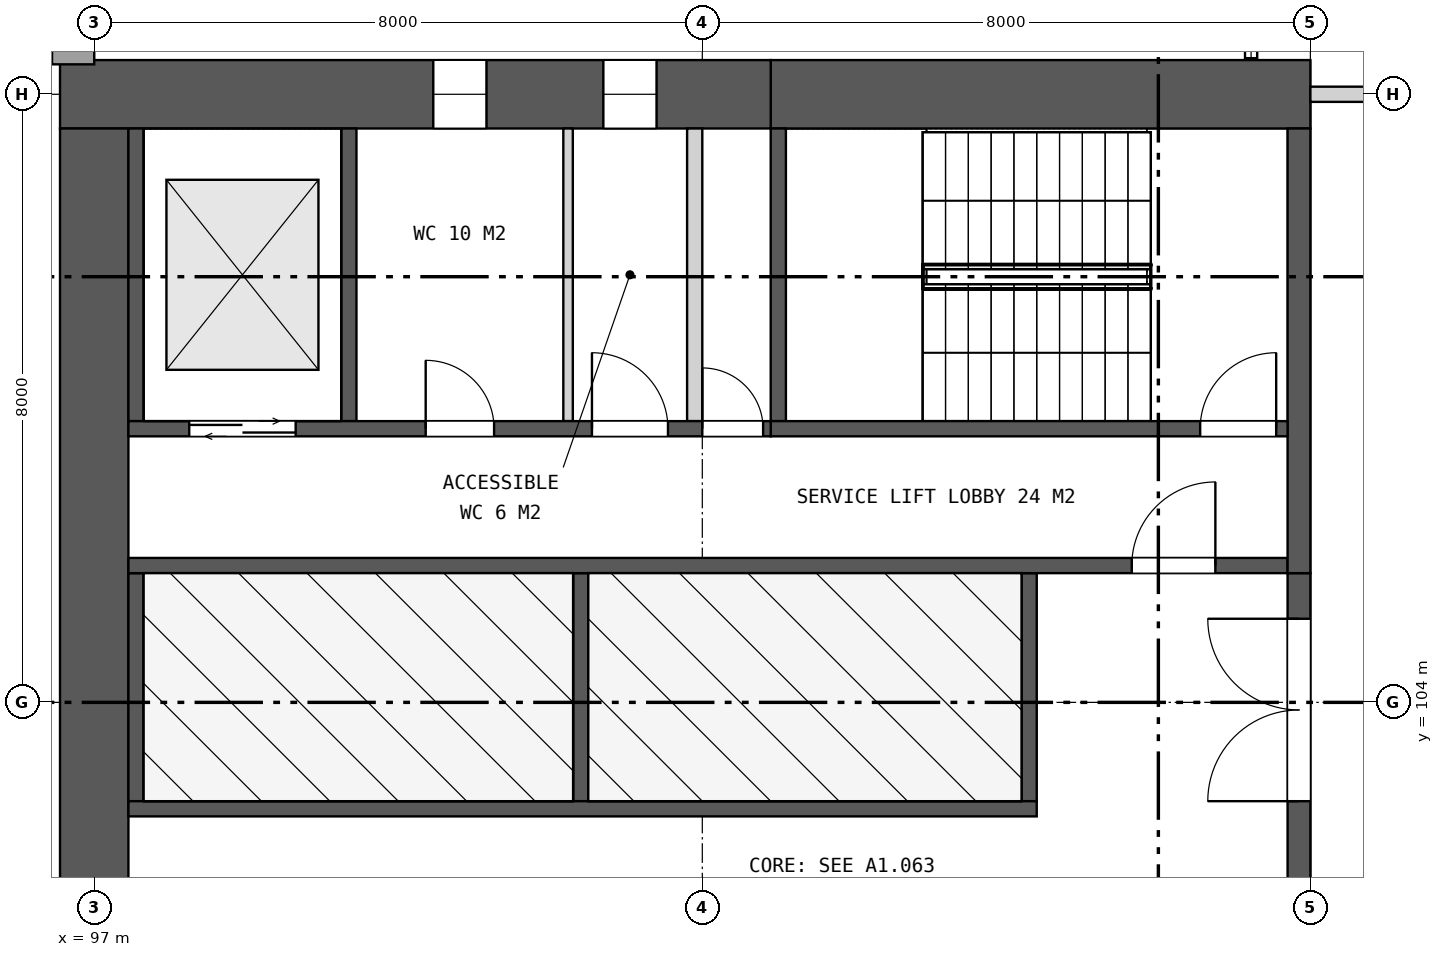
"""IFC4 building model, lengths in metres.
Left out: names, types, materials, properties, quantities, classifications, styles, units other than length and angle.
Written with IfcOpenShell. Run it as: python <this file> out.ifc"""

import sys

from ifc_helpers import new_model, si_unit, direction, frame, frame_2d, origin, place, context, subcontext, project, spatial, rectangle, extrude, element, fill, save


model = new_model("IFC4")
c1 = context("Model", 3, precision=1e-05, world=origin(), true_north=direction((0.0, 1.0)))
c2 = subcontext(c1, "Body", "Model", "MODEL_VIEW")
j1 = project(units=[si_unit("LENGTHUNIT", "METRE"), si_unit("PLANEANGLEUNIT", "RADIAN")], contexts=[c1])
p1 = place(None, origin())
s1 = spatial("IfcSite", under=j1, at=p1, CompositionType="ELEMENT")
p2 = place(p1, origin())
s2 = spatial("IfcBuilding", under=s1, at=p2, CompositionType="ELEMENT")
p3 = place(p2, frame((0.0, 0.0, 41.5)))
s3 = spatial("IfcBuildingStorey", under=s2, at=p3, CompositionType="ELEMENT", Elevation=41.5)
p4 = place(p3, frame((113.0, 112.0, 0.0), z_axis=(0.0, 0.0, 1.0), x_axis=(-1.0, 0.0, 0.0)))
e1 = element("IfcWall", 1, at=p4, inside=s3, PredefinedType="SHEAR", context=c2, shape_type="SweptSolid", body=[
    extrude(rectangle(XDim=7.1, YDim=0.9, at=frame_2d((3.55, 0.0))), origin(), (0.0, 0.0, 1.0), 6.0),
])
p5 = place(p3, frame((105.9, 112.0, 0.0), z_axis=(0.0, 0.0, 1.0), x_axis=(-1.0, 0.0, 0.0)))
e2 = element("IfcWall", 2, at=p5, inside=s3, PredefinedType="SHEAR", context=c2, shape_type="SweptSolid", body=[
    extrude(rectangle(XDim=9.35, YDim=0.9, at=frame_2d((4.675, 0.0))), origin(), (0.0, 0.0, 1.0), 6.0),
])
p6 = place(p5, frame((1.502, 0.0, 1.5)))
e3 = element("IfcOpeningElement", 3, at=p6, cuts=e2, PredefinedType="OPENING", context=c2, shape_type="SweptSolid", body=[
    extrude(rectangle(XDim=0.7, YDim=0.9, at=frame_2d((0.35, 0.45))), frame((0.0, 0.46, 0.0), z_axis=(0.0, -1.0, 0.0), x_axis=(1.0, 0.0, 0.0)), (0.0, 0.0, 1.0), 0.92),
])
p7 = place(p5, frame((3.739, 0.0, 1.5)))
e4 = element("IfcOpeningElement", 4, at=p7, cuts=e2, PredefinedType="OPENING", context=c2, shape_type="SweptSolid", body=[
    extrude(rectangle(XDim=0.7, YDim=0.9, at=frame_2d((0.35, 0.45))), frame((0.0, 0.46, 0.0), z_axis=(0.0, -1.0, 0.0), x_axis=(1.0, 0.0, 0.0)), (0.0, 0.0, 1.0), 0.92),
])
p8 = place(p3, frame((97.0, 111.55, 0.0), z_axis=(0.0, 0.0, 1.0), x_axis=(0.0, -1.0, 0.0)))
e5 = element("IfcWall", 5, at=p8, inside=s3, PredefinedType="SHEAR", context=c2, shape_type="SweptSolid", body=[
    extrude(rectangle(XDim=23.1, YDim=0.9, at=frame_2d((11.55, 0.0))), origin(), (0.0, 0.0, 1.0), 6.0),
])
p9 = place(p8, frame((10.35, 0.0, 0.0)))
e6 = element("IfcOpeningElement", 6, at=p9, cuts=e5, PredefinedType="OPENING", context=c2, shape_type="SweptSolid", body=[
    extrude(rectangle(XDim=2.4, YDim=2.4, at=frame_2d((1.2, 1.2))), frame((0.0, 0.46, 0.0), z_axis=(0.0, -1.0, 0.0), x_axis=(1.0, 0.0, 0.0)), (0.0, 0.0, 1.0), 0.92),
])
p10 = place(p3, frame((112.85, 105.7, 0.0), z_axis=(0.0, 0.0, 1.0), x_axis=(0.0, -1.0, 0.0)))
e7 = element("IfcWall", 7, at=p10, inside=s3, PredefinedType="SHEAR", context=c2, shape_type="SweptSolid", body=[
    extrude(rectangle(XDim=11.4, YDim=0.3, at=frame_2d((5.7, 0.0))), origin(), (0.0, 0.0, 1.0), 6.0),
])
p11 = place(p10, frame((0.6, 0.0, 0.0)))
e8 = element("IfcOpeningElement", 8, at=p11, cuts=e7, PredefinedType="OPENING", context=c2, shape_type="SweptSolid", body=[
    extrude(rectangle(XDim=2.4, YDim=2.4, at=frame_2d((1.2, 1.2))), frame((0.0, 0.16, 0.0), z_axis=(0.0, -1.0, 0.0), x_axis=(1.0, 0.0, 0.0)), (0.0, 0.0, 1.0), 0.32),
])
p12 = place(p10, frame((4.5, 0.0, 0.0)))
e9 = element("IfcOpeningElement", 9, at=p12, cuts=e7, PredefinedType="OPENING", context=c2, shape_type="SweptSolid", body=[
    extrude(rectangle(XDim=2.4, YDim=2.4, at=frame_2d((1.2, 1.2))), frame((0.0, 0.16, 0.0), z_axis=(0.0, -1.0, 0.0), x_axis=(1.0, 0.0, 0.0)), (0.0, 0.0, 1.0), 0.32),
])
p13 = place(p10, frame((8.4, 0.0, 0.0)))
e10 = element("IfcOpeningElement", 10, at=p13, cuts=e7, PredefinedType="OPENING", context=c2, shape_type="SweptSolid", body=[
    extrude(rectangle(XDim=2.4, YDim=2.4, at=frame_2d((1.2, 1.2))), frame((0.0, 0.16, 0.0), z_axis=(0.0, -1.0, 0.0), x_axis=(1.0, 0.0, 0.0)), (0.0, 0.0, 1.0), 0.32),
])
for number, where, z_axis, x_axis in (
    (11, (109.3, 105.7, 0.0), (0.0, 0.0, 1.0), (0.0, -1.0, 0.0)),
    (12, (103.4, 105.7, 0.0), (0.0, 0.0, 1.0), (0.0, -1.0, 0.0)),
    (13, (97.55, 105.7, 0.0), (0.0, 0.0, 1.0), (0.0, -1.0, 0.0)),
):
    element("IfcWall", number, at=place(p3, frame(where, z_axis=z_axis, x_axis=x_axis)), inside=s3, PredefinedType="SHEAR", context=c2, shape_type="SweptSolid", body=[
        extrude(rectangle(XDim=3.0, YDim=0.2, at=frame_2d((1.5, 0.0))), origin(), (0.0, 0.0, 1.0), 6.0),
    ])
p14 = place(p3, frame((109.4, 102.6, 0.0), z_axis=(0.0, 0.0, 1.0), x_axis=(-1.0, 0.0, 0.0)))
e14 = element("IfcWall", 14, at=p14, inside=s3, PredefinedType="SHEAR", context=c2, shape_type="SweptSolid", body=[
    extrude(rectangle(XDim=11.95, YDim=0.2, at=frame_2d((5.975, 0.0))), origin(), (0.0, 0.0, 1.0), 6.0),
])
p15 = place(p3, frame((112.7, 105.8, 0.0), z_axis=(0.0, 0.0, 1.0), x_axis=(-1.0, 0.0, 0.0)))
e15 = element("IfcWall", 15, at=p15, inside=s3, PredefinedType="SHEAR", context=c2, shape_type="SweptSolid", body=[
    extrude(rectangle(XDim=15.25, YDim=0.2, at=frame_2d((7.625, 0.0))), origin(), (0.0, 0.0, 1.0), 6.0),
])
p16 = place(p15, frame((0.95, 0.0, 0.0)))
e16 = element("IfcOpeningElement", 16, at=p16, cuts=e15, PredefinedType="OPENING", context=c2, shape_type="SweptSolid", body=[
    extrude(rectangle(XDim=1.1, YDim=2.1, at=frame_2d((0.55, 1.05))), frame((0.0, 0.11, 0.0), z_axis=(0.0, -1.0, 0.0), x_axis=(1.0, 0.0, 0.0)), (0.0, 0.0, 1.0), 0.22),
])
p17 = place(p3, frame((112.85, 111.55, 0.0), z_axis=(0.0, 0.0, 1.0), x_axis=(0.0, -1.0, 0.0)))
e17 = element("IfcWall", 17, at=p17, inside=s3, PredefinedType="SHEAR", context=c2, shape_type="SweptSolid", body=[
    extrude(rectangle(XDim=5.85, YDim=0.3, at=frame_2d((2.925, 0.0))), origin(), (0.0, 0.0, 1.0), 6.0),
])
for number, where, z_axis, x_axis in (
    (18, (106.0, 111.55, 0.0), (0.0, 0.0, 1.0), (0.0, -1.0, 0.0)),
    (19, (100.35, 111.55, 0.0), (0.0, 0.0, 1.0), (0.0, -1.0, 0.0)),
    (20, (97.55, 111.55, 0.0), (0.0, 0.0, 1.0), (0.0, -1.0, 0.0)),
):
    element("IfcWall", number, at=place(p3, frame(where, z_axis=z_axis, x_axis=x_axis)), inside=s3, PredefinedType="SHEAR", context=c2, shape_type="SweptSolid", body=[
        extrude(rectangle(XDim=3.85, YDim=0.2, at=frame_2d((1.925, 0.0))), origin(), (0.0, 0.0, 1.0), 6.0),
    ])
p18 = place(p3, frame((104.9, 111.55, 0.0), z_axis=(0.0, 0.0, 1.0), x_axis=(0.0, -1.0, 0.0)))
e21 = element("IfcWall", 21, at=p18, inside=s3, PredefinedType="PARTITIONING", context=c2, shape_type="SweptSolid", body=[
    extrude(rectangle(XDim=3.85, YDim=0.2, at=frame_2d((1.925, 0.0))), origin(), (0.0, 0.0, 1.0), 6.0),
])
p19 = place(p3, frame((103.234, 111.55, 0.0), z_axis=(0.0, 0.0, 1.0), x_axis=(0.0, -1.0, 0.0)))
e22 = element("IfcWall", 22, at=p19, inside=s3, PredefinedType="PARTITIONING", context=c2, shape_type="SweptSolid", body=[
    extrude(rectangle(XDim=3.85, YDim=0.125, at=frame_2d((1.925, 0.0))), origin(), (0.0, 0.0, 1.0), 6.0),
])
p20 = place(p3, frame((112.7, 107.6, 0.0), z_axis=(0.0, 0.0, 1.0), x_axis=(-1.0, 0.0, 0.0)))
e23 = element("IfcWall", 23, at=p20, inside=s3, PredefinedType="SHEAR", context=c2, shape_type="SweptSolid", body=[
    extrude(rectangle(XDim=6.8, YDim=0.2, at=frame_2d((3.4, 0.0))), origin(), (0.0, 0.0, 1.0), 6.0),
])
p21 = place(p20, frame((0.15, 0.0, 0.0)))
e24 = element("IfcOpeningElement", 24, at=p21, cuts=e23, PredefinedType="OPENING", context=c2, shape_type="SweptSolid", body=[
    extrude(rectangle(XDim=1.0, YDim=2.1, at=frame_2d((0.5, 1.05))), frame((0.0, 0.11, 0.0), z_axis=(0.0, -1.0, 0.0), x_axis=(1.0, 0.0, 0.0)), (0.0, 0.0, 1.0), 0.22),
])
p22 = place(p3, frame((105.9, 107.6, 0.0), z_axis=(0.0, 0.0, 1.0), x_axis=(-1.0, 0.0, 0.0)))
e25 = element("IfcWall", 25, at=p22, inside=s3, PredefinedType="SHEAR", context=c2, shape_type="SweptSolid", body=[
    extrude(rectangle(XDim=8.45, YDim=0.2, at=frame_2d((4.225, 0.0))), origin(), (0.0, 0.0, 1.0), 6.0),
])
p23 = place(p22, frame((0.1, 0.0, 0.0)))
e26 = element("IfcOpeningElement", 26, at=p23, cuts=e25, PredefinedType="OPENING", context=c2, shape_type="SweptSolid", body=[
    extrude(rectangle(XDim=0.8, YDim=2.1, at=frame_2d((0.4, 1.05))), frame((0.0, 0.11, 0.0), z_axis=(0.0, -1.0, 0.0), x_axis=(1.0, 0.0, 0.0)), (0.0, 0.0, 1.0), 0.22),
])
p24 = place(p22, frame((1.352, 0.0, 0.0)))
e27 = element("IfcOpeningElement", 27, at=p24, cuts=e25, PredefinedType="OPENING", context=c2, shape_type="SweptSolid", body=[
    extrude(rectangle(XDim=1.0, YDim=2.1, at=frame_2d((0.5, 1.05))), frame((0.0, 0.11, 0.0), z_axis=(0.0, -1.0, 0.0), x_axis=(1.0, 0.0, 0.0)), (0.0, 0.0, 1.0), 0.22),
])
p25 = place(p22, frame((3.639, 0.0, 0.0)))
e28 = element("IfcOpeningElement", 28, at=p25, cuts=e25, PredefinedType="OPENING", context=c2, shape_type="SweptSolid", body=[
    extrude(rectangle(XDim=0.9, YDim=2.1, at=frame_2d((0.45, 1.05))), frame((0.0, 0.11, 0.0), z_axis=(0.0, -1.0, 0.0), x_axis=(1.0, 0.0, 0.0)), (0.0, 0.0, 1.0), 0.22),
])
p26 = place(p22, frame((6.25, 0.0, 0.0)))
e29 = element("IfcOpeningElement", 29, at=p26, cuts=e25, PredefinedType="OPENING", context=c2, shape_type="SweptSolid", body=[
    extrude(rectangle(XDim=1.4, YDim=2.1, at=frame_2d((0.7, 1.05))), frame((0.0, 0.11, 0.0), z_axis=(0.0, -1.0, 0.0), x_axis=(1.0, 0.0, 0.0)), (0.0, 0.0, 1.0), 0.22),
])
p27 = place(p3, frame((96.445, 112.547, 0.0), z_axis=(0.0, 0.0, 1.0), x_axis=(1.0, 0.0, 0.0)))
e30 = element("IfcWall", 30, at=p27, inside=s3, PredefinedType="SOLIDWALL", context=c2, shape_type="SweptSolid", body=[
    extrude(rectangle(XDim=0.555, YDim=0.306, at=frame_2d((0.277, 0.0))), origin(), (0.0, 0.0, 1.0), 5.6),
])
p28 = place(p3, frame((113.0, 112.0, 0.0), z_axis=(0.0, 0.0, 1.0), x_axis=(1.0, 0.0, 0.0)))
e31 = element("IfcWall", 31, at=p28, inside=s3, PredefinedType="PARTITIONING", context=c2, shape_type="SweptSolid", body=[
    extrude(rectangle(XDim=7.4, YDim=0.2, at=frame_2d((3.7, 0.0))), origin(), (0.0, 0.0, 1.0), 5.055),
])
p29 = place(p6, origin())
e32 = element("IfcWindow", 32, at=p29, inside=s3, PartitioningType="SINGLE_PANEL", PredefinedType="WINDOW", context=c2, shape_type="SweptSolid", body=[
    extrude(rectangle(XDim=0.7, YDim=0.9, at=frame_2d((0.35, 0.45))), frame((0.0, 0.03, 0.0), z_axis=(0.0, -1.0, 0.0), x_axis=(1.0, 0.0, 0.0)), (0.0, 0.0, 1.0), 0.06),
])
fill(e3, e32)
p30 = place(p7, origin())
e33 = element("IfcWindow", 33, at=p30, inside=s3, PartitioningType="SINGLE_PANEL", PredefinedType="WINDOW", context=c2, shape_type="SweptSolid", body=[
    extrude(rectangle(XDim=0.7, YDim=0.9, at=frame_2d((0.35, 0.45))), frame((0.0, 0.03, 0.0), z_axis=(0.0, -1.0, 0.0), x_axis=(1.0, 0.0, 0.0)), (0.0, 0.0, 1.0), 0.06),
])
fill(e4, e33)
p31 = place(p11, frame((2.4, 0.0, 0.0), z_axis=(0.0, 0.0, 1.0), x_axis=(-1.0, 0.0, 0.0)))
e34 = element("IfcDoor", 34, at=p31, inside=s3, OperationType="DOUBLE_DOOR_SINGLE_SWING", PredefinedType="DOOR", context=c2, shape_type="SweptSolid", body=[
    extrude(rectangle(XDim=2.4, YDim=2.4, at=frame_2d((1.2, 1.2))), frame((0.0, 0.025, 0.0), z_axis=(0.0, -1.0, 0.0), x_axis=(1.0, 0.0, 0.0)), (0.0, 0.0, 1.0), 0.05),
])
fill(e8, e34)
p32 = place(p16, frame((1.1, 0.0, 0.0), z_axis=(0.0, 0.0, 1.0), x_axis=(-1.0, 0.0, 0.0)))
e35 = element("IfcDoor", 35, at=p32, inside=s3, OperationType="SINGLE_SWING_RIGHT", PredefinedType="DOOR", context=c2, shape_type="SweptSolid", body=[
    extrude(rectangle(XDim=1.1, YDim=2.1, at=frame_2d((0.55, 1.05))), frame((0.0, 0.025, 0.0), z_axis=(0.0, -1.0, 0.0), x_axis=(1.0, 0.0, 0.0)), (0.0, 0.0, 1.0), 0.05),
])
fill(e16, e35)
p33 = place(p21, frame((1.0, 0.0, 0.0), z_axis=(0.0, 0.0, 1.0), x_axis=(-1.0, 0.0, 0.0)))
e36 = element("IfcDoor", 36, at=p33, inside=s3, OperationType="SINGLE_SWING_RIGHT", PredefinedType="DOOR", context=c2, shape_type="SweptSolid", body=[
    extrude(rectangle(XDim=1.0, YDim=2.1, at=frame_2d((0.5, 1.05))), frame((0.0, 0.025, 0.0), z_axis=(0.0, -1.0, 0.0), x_axis=(1.0, 0.0, 0.0)), (0.0, 0.0, 1.0), 0.05),
])
fill(e24, e36)
p34 = place(p23, frame((0.8, 0.0, 0.0), z_axis=(0.0, 0.0, 1.0), x_axis=(-1.0, 0.0, 0.0)))
e37 = element("IfcDoor", 37, at=p34, inside=s3, OperationType="SINGLE_SWING_LEFT", PredefinedType="DOOR", context=c2, shape_type="SweptSolid", body=[
    extrude(rectangle(XDim=0.8, YDim=2.1, at=frame_2d((0.4, 1.05))), frame((0.0, 0.025, 0.0), z_axis=(0.0, -1.0, 0.0), x_axis=(1.0, 0.0, 0.0)), (0.0, 0.0, 1.0), 0.05),
])
fill(e26, e37)
p35 = place(p24, frame((1.0, 0.0, 0.0), z_axis=(0.0, 0.0, 1.0), x_axis=(-1.0, 0.0, 0.0)))
e38 = element("IfcDoor", 38, at=p35, inside=s3, OperationType="SINGLE_SWING_LEFT", PredefinedType="DOOR", context=c2, shape_type="SweptSolid", body=[
    extrude(rectangle(XDim=1.0, YDim=2.1, at=frame_2d((0.5, 1.05))), frame((0.0, 0.025, 0.0), z_axis=(0.0, -1.0, 0.0), x_axis=(1.0, 0.0, 0.0)), (0.0, 0.0, 1.0), 0.05),
])
fill(e27, e38)
p36 = place(p25, frame((0.9, 0.0, 0.0), z_axis=(0.0, 0.0, 1.0), x_axis=(-1.0, 0.0, 0.0)))
e39 = element("IfcDoor", 39, at=p36, inside=s3, OperationType="SINGLE_SWING_LEFT", PredefinedType="DOOR", context=c2, shape_type="SweptSolid", body=[
    extrude(rectangle(XDim=0.9, YDim=2.1, at=frame_2d((0.45, 1.05))), frame((0.0, 0.025, 0.0), z_axis=(0.0, -1.0, 0.0), x_axis=(1.0, 0.0, 0.0)), (0.0, 0.0, 1.0), 0.05),
])
fill(e28, e39)
p37 = place(p26, origin())
e40 = element("IfcDoor", 40, at=p37, inside=s3, OperationType="DOUBLE_DOOR_SLIDING", PredefinedType="DOOR", context=c2, shape_type="SweptSolid", body=[
    extrude(rectangle(XDim=1.4, YDim=2.1, at=frame_2d((0.7, 1.05))), frame((0.0, 0.025, 0.0), z_axis=(0.0, -1.0, 0.0), x_axis=(1.0, 0.0, 0.0)), (0.0, 0.0, 1.0), 0.05),
])
fill(e29, e40)
save(model, sys.argv[1])
